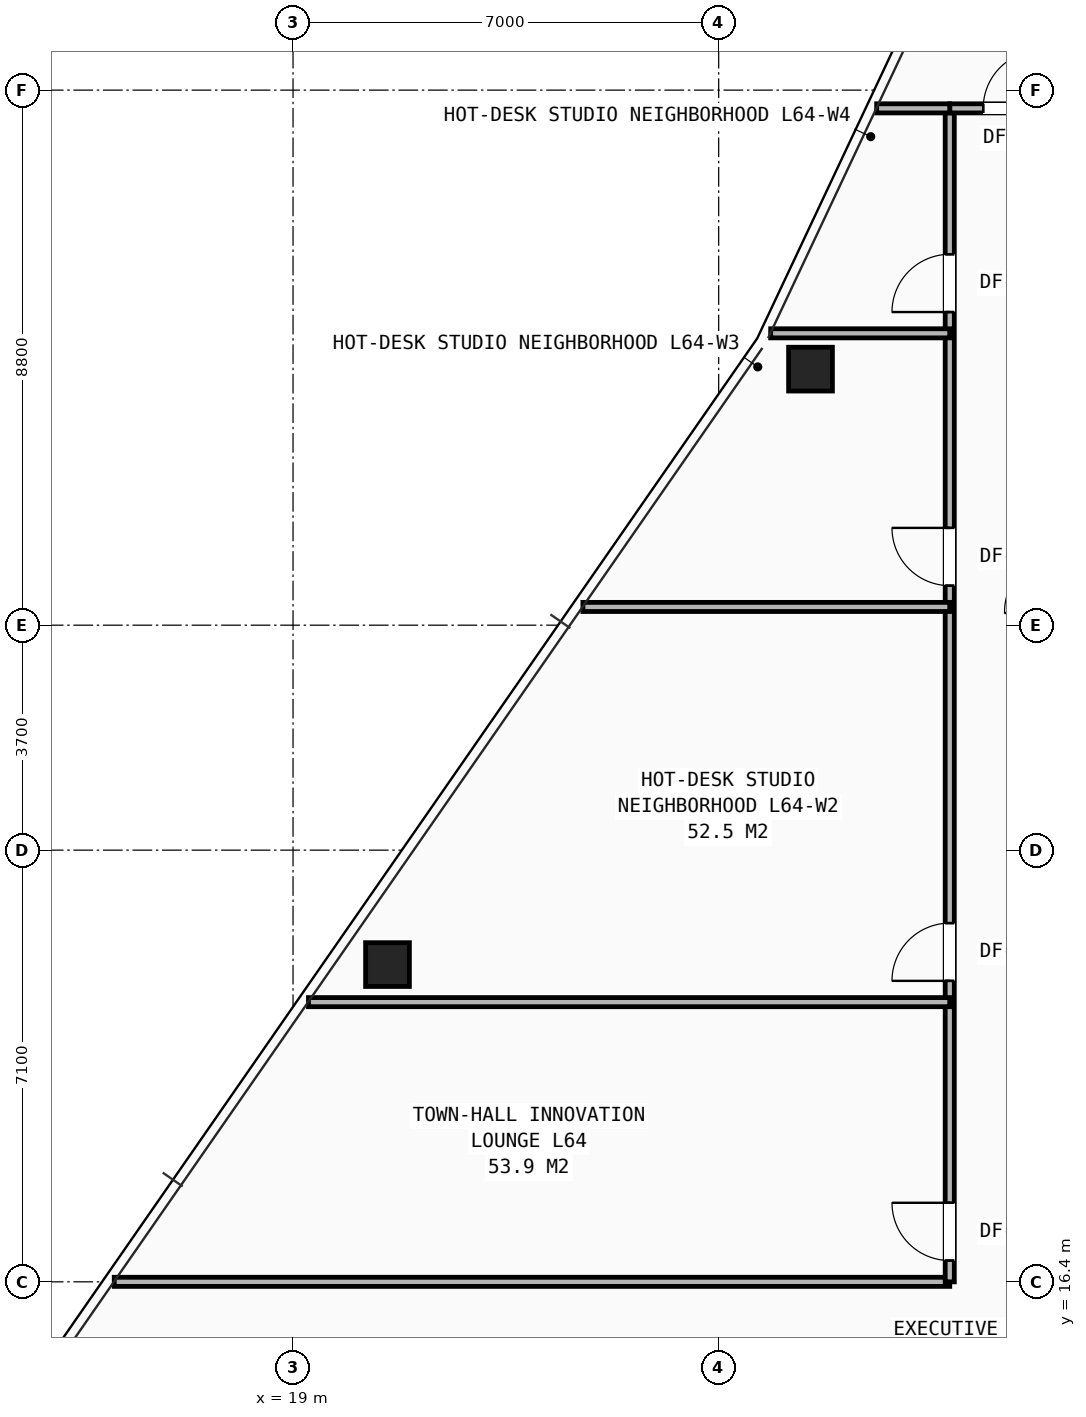
"""IFC4 building model, lengths in metres.
Left out: names, types, materials, properties, quantities, classifications, styles, units other than length and angle.
Written with IfcOpenShell. Run it as: python <this file> out.ifc"""

import sys

from ifc_helpers import new_model, si_unit, direction, frame, frame_2d, origin, origin_2d, place, context, subcontext, project, spatial, rectangle, hollow_rectangle, extrude, element, fill, save


model = new_model("IFC4")
c1 = context("Model", 3, precision=1e-05, world=origin(), true_north=direction((0.0, 1.0)))
c2 = subcontext(c1, "Body", "Model", "MODEL_VIEW")
j1 = project(units=[si_unit("LENGTHUNIT", "METRE"), si_unit("PLANEANGLEUNIT", "RADIAN")], contexts=[c1])
p1 = place(None, origin())
s1 = spatial("IfcSite", under=j1, at=p1, CompositionType="ELEMENT")
p2 = place(p1, origin())
s2 = spatial("IfcBuilding", under=s1, at=p2, CompositionType="ELEMENT")
p3 = place(p2, frame((0.0, 0.0, 225.9)))
s3 = spatial("IfcBuildingStorey", under=s2, at=p3, CompositionType="ELEMENT", Elevation=225.9)
for number, where, z_axis, x_axis in (
    (1, (27.51, 31.411, 0.0), (0.0, 0.0, 1.0), (1.0, 0.0, 0.0)),
    (2, (20.553, 21.618, 0.0), (0.0, 0.0, 1.0), (1.0, 0.0, 0.0)),
):
    element("IfcColumn", number, at=place(p3, frame(where, z_axis=z_axis, x_axis=x_axis)), inside=s3, PredefinedType="COLUMN", context=c2, shape_type="SweptSolid", body=[
        extrude(hollow_rectangle(XDim=0.72, YDim=0.72, WallThickness=0.05, at=origin_2d()), origin(), (0.0, 0.0, 1.0), 3.5),
    ])
p4 = place(p3, frame((16.06, 16.4, 0.0), z_axis=(0.0, 0.0, 1.0), x_axis=(1.0, 0.0, 0.0)))
e3 = element("IfcWall", 3, at=p4, inside=s3, PredefinedType="PARTITIONING", context=c2, shape_type="SweptSolid", body=[
    extrude(rectangle(XDim=13.74, YDim=0.15, at=frame_2d((6.87, 0.0))), origin(), (0.0, 0.0, 1.0), 2.292),
])
p5 = place(p3, frame((29.8, 16.4, 0.0), z_axis=(0.0, 0.0, 1.0), x_axis=(0.0, 1.0, 0.0)))
e4 = element("IfcWall", 4, at=p5, inside=s3, PredefinedType="PARTITIONING", context=c2, shape_type="SweptSolid", body=[
    extrude(rectangle(XDim=19.3, YDim=0.15, at=frame_2d((9.65, 0.0))), origin(), (0.0, 0.0, 1.0), 2.292),
])
p6 = place(p5, frame((0.35, 0.0, 0.0)))
e5 = element("IfcOpeningElement", 5, at=p6, cuts=e4, PredefinedType="OPENING", context=c2, shape_type="SweptSolid", body=[
    extrude(rectangle(XDim=0.95, YDim=2.1, at=frame_2d((0.475, 1.05))), frame((0.0, 0.085, 0.0), z_axis=(0.0, -1.0, 0.0), x_axis=(1.0, 0.0, 0.0)), (0.0, 0.0, 1.0), 0.17),
])
p7 = place(p5, frame((4.95, 0.0, 0.0)))
e6 = element("IfcOpeningElement", 6, at=p7, cuts=e4, PredefinedType="OPENING", context=c2, shape_type="SweptSolid", body=[
    extrude(rectangle(XDim=0.95, YDim=2.1, at=frame_2d((0.475, 1.05))), frame((0.0, 0.085, 0.0), z_axis=(0.0, -1.0, 0.0), x_axis=(1.0, 0.0, 0.0)), (0.0, 0.0, 1.0), 0.17),
])
p8 = place(p5, frame((11.45, 0.0, 0.0)))
e7 = element("IfcOpeningElement", 7, at=p8, cuts=e4, PredefinedType="OPENING", context=c2, shape_type="SweptSolid", body=[
    extrude(rectangle(XDim=0.95, YDim=2.1, at=frame_2d((0.475, 1.05))), frame((0.0, 0.085, 0.0), z_axis=(0.0, -1.0, 0.0), x_axis=(1.0, 0.0, 0.0)), (0.0, 0.0, 1.0), 0.17),
])
p9 = place(p5, frame((15.95, 0.0, 0.0)))
e8 = element("IfcOpeningElement", 8, at=p9, cuts=e4, PredefinedType="OPENING", context=c2, shape_type="SweptSolid", body=[
    extrude(rectangle(XDim=0.95, YDim=2.1, at=frame_2d((0.475, 1.05))), frame((0.0, 0.085, 0.0), z_axis=(0.0, -1.0, 0.0), x_axis=(1.0, 0.0, 0.0)), (0.0, 0.0, 1.0), 0.17),
])
p10 = place(p3, frame((29.8, 35.7, 0.0), z_axis=(0.0, 0.0, 1.0), x_axis=(1.0, 0.0, 0.0)))
e9 = element("IfcWall", 9, at=p10, inside=s3, PredefinedType="PARTITIONING", context=c2, shape_type="SweptSolid", body=[
    extrude(rectangle(XDim=9.45, YDim=0.15, at=frame_2d((4.725, 0.0))), origin(), (0.0, 0.0, 1.0), 2.628),
])
p11 = place(p10, frame((0.55, 0.0, 0.0)))
e10 = element("IfcOpeningElement", 10, at=p11, cuts=e9, PredefinedType="OPENING", context=c2, shape_type="SweptSolid", body=[
    extrude(rectangle(XDim=0.95, YDim=2.1, at=frame_2d((0.475, 1.05))), frame((0.0, 0.085, 0.0), z_axis=(0.0, -1.0, 0.0), x_axis=(1.0, 0.0, 0.0)), (0.0, 0.0, 1.0), 0.17),
])
p12 = place(p10, frame((7.05, 0.0, 0.0)))
e11 = element("IfcOpeningElement", 11, at=p12, cuts=e9, PredefinedType="OPENING", context=c2, shape_type="SweptSolid", body=[
    extrude(rectangle(XDim=0.95, YDim=2.1, at=frame_2d((0.475, 1.05))), frame((0.0, 0.085, 0.0), z_axis=(0.0, -1.0, 0.0), x_axis=(1.0, 0.0, 0.0)), (0.0, 0.0, 1.0), 0.17),
])
p13 = place(p3, frame((28.598, 35.7, 0.0), z_axis=(0.0, 0.0, 1.0), x_axis=(1.0, 0.0, 0.0)))
e12 = element("IfcWall", 12, at=p13, inside=s3, PredefinedType="PARTITIONING", context=c2, shape_type="SweptSolid", body=[
    extrude(rectangle(XDim=1.202, YDim=0.15, at=frame_2d((0.601, 0.0))), origin(), (0.0, 0.0, 1.0), 2.628),
])
p14 = place(p3, frame((19.254, 21.0, 0.0), z_axis=(0.0, 0.0, 1.0), x_axis=(1.0, 0.0, 0.0)))
e13 = element("IfcWall", 13, at=p14, inside=s3, PredefinedType="PARTITIONING", context=c2, shape_type="SweptSolid", body=[
    extrude(rectangle(XDim=10.546, YDim=0.15, at=frame_2d((5.273, 0.0))), origin(), (0.0, 0.0, 1.0), 2.292),
])
p15 = place(p3, frame((23.767, 27.5, 0.0), z_axis=(0.0, 0.0, 1.0), x_axis=(1.0, 0.0, 0.0)))
e14 = element("IfcWall", 14, at=p15, inside=s3, PredefinedType="PARTITIONING", context=c2, shape_type="SweptSolid", body=[
    extrude(rectangle(XDim=6.033, YDim=0.15, at=frame_2d((3.016, 0.0))), origin(), (0.0, 0.0, 1.0), 2.628),
])
p16 = place(p3, frame((26.855, 32.0, 0.0), z_axis=(0.0, 0.0, 1.0), x_axis=(1.0, 0.0, 0.0)))
e15 = element("IfcWall", 15, at=p16, inside=s3, PredefinedType="PARTITIONING", context=c2, shape_type="SweptSolid", body=[
    extrude(rectangle(XDim=2.945, YDim=0.15, at=frame_2d((1.473, 0.0))), origin(), (0.0, 0.0, 1.0), 2.628),
])
p17 = place(p6, origin())
e16 = element("IfcDoor", 16, at=p17, inside=s3, OperationType="SINGLE_SWING_RIGHT", PredefinedType="DOOR", context=c2, shape_type="SweptSolid", body=[
    extrude(rectangle(XDim=0.95, YDim=2.1, at=frame_2d((0.475, 1.05))), frame((0.0, 0.025, 0.0), z_axis=(0.0, -1.0, 0.0), x_axis=(1.0, 0.0, 0.0)), (0.0, 0.0, 1.0), 0.05),
])
fill(e5, e16)
p18 = place(p7, origin())
e17 = element("IfcDoor", 17, at=p18, inside=s3, OperationType="SINGLE_SWING_LEFT", PredefinedType="DOOR", context=c2, shape_type="SweptSolid", body=[
    extrude(rectangle(XDim=0.95, YDim=2.1, at=frame_2d((0.475, 1.05))), frame((0.0, 0.025, 0.0), z_axis=(0.0, -1.0, 0.0), x_axis=(1.0, 0.0, 0.0)), (0.0, 0.0, 1.0), 0.05),
])
fill(e6, e17)
p19 = place(p8, origin())
e18 = element("IfcDoor", 18, at=p19, inside=s3, OperationType="SINGLE_SWING_RIGHT", PredefinedType="DOOR", context=c2, shape_type="SweptSolid", body=[
    extrude(rectangle(XDim=0.95, YDim=2.1, at=frame_2d((0.475, 1.05))), frame((0.0, 0.025, 0.0), z_axis=(0.0, -1.0, 0.0), x_axis=(1.0, 0.0, 0.0)), (0.0, 0.0, 1.0), 0.05),
])
fill(e7, e18)
p20 = place(p9, origin())
e19 = element("IfcDoor", 19, at=p20, inside=s3, OperationType="SINGLE_SWING_LEFT", PredefinedType="DOOR", context=c2, shape_type="SweptSolid", body=[
    extrude(rectangle(XDim=0.95, YDim=2.1, at=frame_2d((0.475, 1.05))), frame((0.0, 0.025, 0.0), z_axis=(0.0, -1.0, 0.0), x_axis=(1.0, 0.0, 0.0)), (0.0, 0.0, 1.0), 0.05),
])
fill(e8, e19)
p21 = place(p11, origin())
e20 = element("IfcDoor", 20, at=p21, inside=s3, OperationType="SINGLE_SWING_RIGHT", PredefinedType="DOOR", context=c2, shape_type="SweptSolid", body=[
    extrude(rectangle(XDim=0.95, YDim=2.1, at=frame_2d((0.475, 1.05))), frame((0.0, 0.025, 0.0), z_axis=(0.0, -1.0, 0.0), x_axis=(1.0, 0.0, 0.0)), (0.0, 0.0, 1.0), 0.05),
])
fill(e10, e20)
save(model, sys.argv[1])
